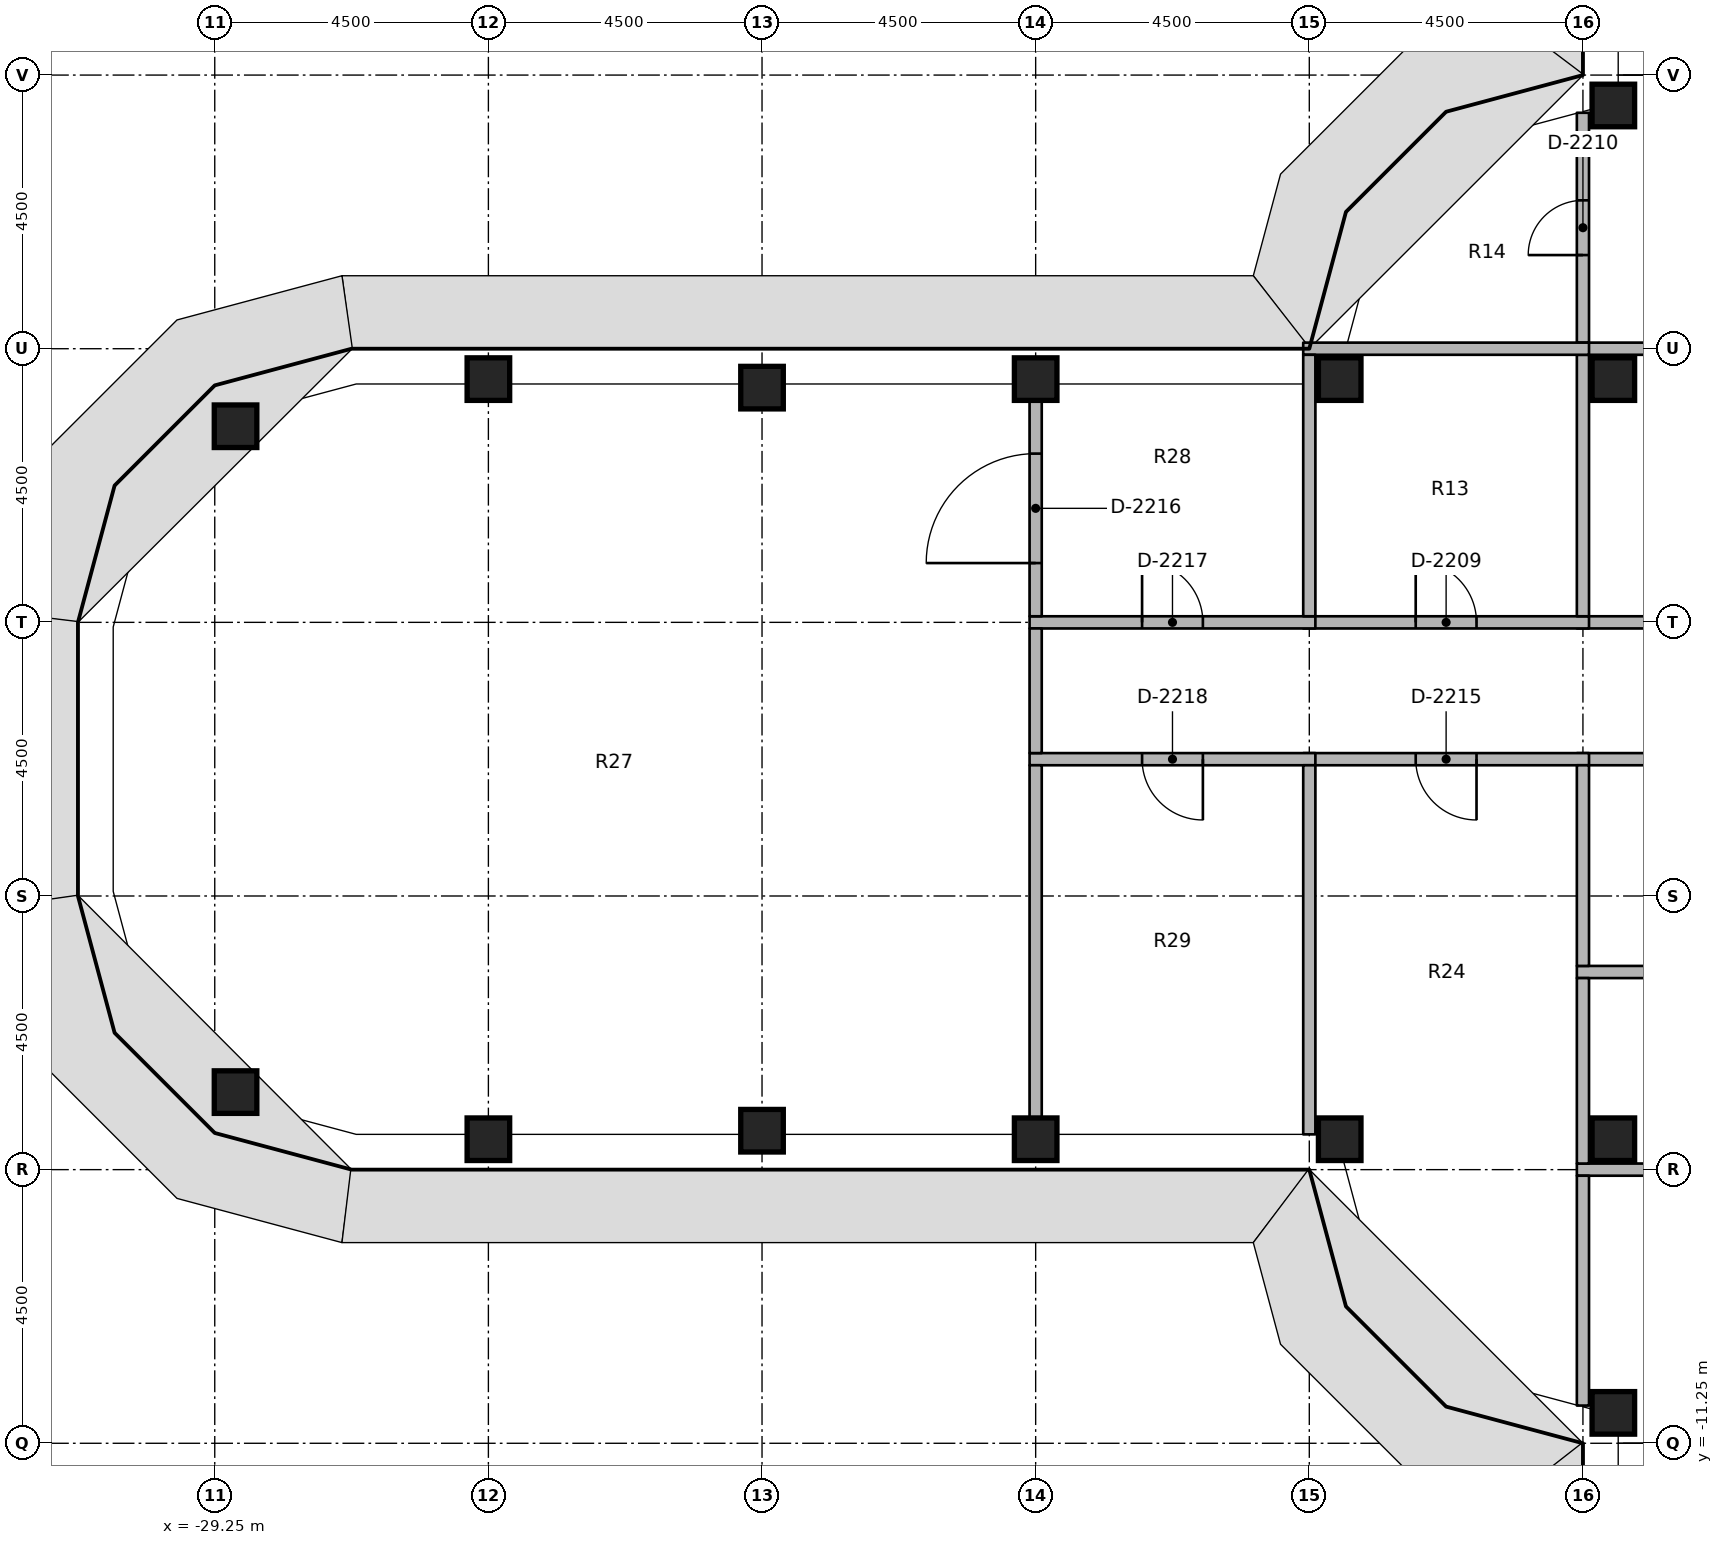
"""IFC4 building model, lengths in metres.
Left out: names, types, materials, properties, quantities, classifications, styles, units other than length and angle.
Written with IfcOpenShell. Run it as: python <this file> out.ifc"""

import sys

from ifc_helpers import new_model, si_unit, direction, frame, frame_2d, origin, origin_2d, place, context, subcontext, project, spatial, rectangle, extrude, element, fill, save


model = new_model("IFC4")
c1 = context("Model", 3, precision=1e-05, world=origin(), true_north=direction((0.0, 1.0)))
c2 = subcontext(c1, "Body", "Model", "MODEL_VIEW")
j1 = project(units=[si_unit("LENGTHUNIT", "METRE"), si_unit("PLANEANGLEUNIT", "RADIAN")], contexts=[c1])
p1 = place(None, origin())
s1 = spatial("IfcSite", under=j1, at=p1, CompositionType="ELEMENT")
p2 = place(p1, origin())
s2 = spatial("IfcBuilding", under=s1, at=p2, CompositionType="ELEMENT")
p3 = place(p2, frame((0.0, 0.0, 206.8)))
s3 = spatial("IfcBuildingStorey", under=s2, at=p3, CompositionType="ELEMENT", Elevation=206.8)
for number, where, z_axis, x_axis in (
    (1, (-28.908, -5.475, 0.0), (0.0, 0.0, 1.0), (1.0, 0.0, 0.0)),
    (2, (-28.908, 5.475, 0.0), (0.0, 0.0, 1.0), (1.0, 0.0, 0.0)),
    (3, (-24.75, -6.25, 0.0), (0.0, 0.0, 1.0), (1.0, 0.0, 0.0)),
    (4, (-24.75, 6.25, 0.0), (0.0, 0.0, 1.0), (1.0, 0.0, 0.0)),
    (5, (-20.25, -6.11, 0.0), (0.0, 0.0, 1.0), (1.0, 0.0, 0.0)),
    (6, (-20.25, 6.11, 0.0), (0.0, 0.0, 1.0), (1.0, 0.0, 0.0)),
    (7, (-15.75, -6.25, 0.0), (0.0, 0.0, 1.0), (1.0, 0.0, 0.0)),
    (8, (-15.75, 6.25, 0.0), (0.0, 0.0, 1.0), (1.0, 0.0, 0.0)),
    (9, (-10.75, -6.25, 0.0), (0.0, 0.0, 1.0), (1.0, 0.0, 0.0)),
    (10, (-10.75, 6.25, 0.0), (0.0, 0.0, 1.0), (1.0, 0.0, 0.0)),
    (11, (-6.25, -10.75, 0.0), (0.0, 0.0, 1.0), (1.0, 0.0, 0.0)),
    (12, (-6.25, -6.25, 0.0), (0.0, 0.0, 1.0), (1.0, 0.0, 0.0)),
    (13, (-6.25, 6.25, 0.0), (0.0, 0.0, 1.0), (1.0, 0.0, 0.0)),
    (14, (-6.25, 10.75, 0.0), (0.0, 0.0, 1.0), (1.0, 0.0, 0.0)),
):
    element("IfcColumn", number, at=place(p3, frame(where, z_axis=z_axis, x_axis=x_axis)), inside=s3, PredefinedType="COLUMN", context=c2, shape_type="SweptSolid", body=[
        extrude(rectangle(XDim=0.7, YDim=0.7, at=origin_2d()), origin(), (0.0, 0.0, 1.0), 3.65),
    ])
p4 = place(p3, frame((-6.85, 2.25, 0.0), z_axis=(0.0, 0.0, 1.0), x_axis=(1.0, 0.0, 0.0)))
e15 = element("IfcWall", 15, at=p4, inside=s3, PredefinedType="PARTITIONING", context=c2, shape_type="SweptSolid", body=[
    extrude(rectangle(XDim=5.825, YDim=0.2, at=frame_2d((2.913, 0.0))), origin(), (0.0, 0.0, 1.0), 2.75),
])
p5 = place(p4, frame((2.413, 0.0, 0.0)))
e16 = element("IfcOpeningElement", 16, at=p5, cuts=e15, PredefinedType="OPENING", context=c2, shape_type="SweptSolid", body=[
    extrude(rectangle(XDim=1.0, YDim=2.1, at=frame_2d((0.5, 1.05))), frame((0.0, 0.11, 0.0), z_axis=(0.0, -1.0, 0.0), x_axis=(1.0, 0.0, 0.0)), (0.0, 0.0, 1.0), 0.22),
])
p6 = place(p3, frame((-11.35, 2.25, 0.0), z_axis=(0.0, 0.0, 1.0), x_axis=(1.0, 0.0, 0.0)))
e17 = element("IfcWall", 17, at=p6, inside=s3, PredefinedType="PARTITIONING", context=c2, shape_type="SweptSolid", body=[
    extrude(rectangle(XDim=4.7, YDim=0.2, at=frame_2d((2.35, 0.0))), origin(), (0.0, 0.0, 1.0), 2.75),
])
p7 = place(p6, frame((1.85, 0.0, 0.0)))
e18 = element("IfcOpeningElement", 18, at=p7, cuts=e17, PredefinedType="OPENING", context=c2, shape_type="SweptSolid", body=[
    extrude(rectangle(XDim=1.0, YDim=2.1, at=frame_2d((0.5, 1.05))), frame((0.0, 0.11, 0.0), z_axis=(0.0, -1.0, 0.0), x_axis=(1.0, 0.0, 0.0)), (0.0, 0.0, 1.0), 0.22),
])
p8 = place(p3, frame((-1.025, 0.0, 0.0), z_axis=(0.0, 0.0, 1.0), x_axis=(-1.0, 0.0, 0.0)))
e19 = element("IfcWall", 19, at=p8, inside=s3, PredefinedType="PARTITIONING", context=c2, shape_type="SweptSolid", body=[
    extrude(rectangle(XDim=5.825, YDim=0.2, at=frame_2d((2.913, 0.0))), origin(), (0.0, 0.0, 1.0), 2.75),
])
p9 = place(p8, frame((2.462, 0.0, 0.0)))
e20 = element("IfcOpeningElement", 20, at=p9, cuts=e19, PredefinedType="OPENING", context=c2, shape_type="SweptSolid", body=[
    extrude(rectangle(XDim=0.9, YDim=2.1, at=frame_2d((0.45, 1.05))), frame((0.0, 0.11, 0.0), z_axis=(0.0, -1.0, 0.0), x_axis=(1.0, 0.0, 0.0)), (0.0, 0.0, 1.0), 0.22),
])
p10 = place(p3, frame((-6.65, 0.0, 0.0), z_axis=(0.0, 0.0, 1.0), x_axis=(-1.0, 0.0, 0.0)))
e21 = element("IfcWall", 21, at=p10, inside=s3, PredefinedType="PARTITIONING", context=c2, shape_type="SweptSolid", body=[
    extrude(rectangle(XDim=4.7, YDim=0.2, at=frame_2d((2.35, 0.0))), origin(), (0.0, 0.0, 1.0), 2.75),
])
p11 = place(p10, frame((1.85, 0.0, 0.0)))
e22 = element("IfcOpeningElement", 22, at=p11, cuts=e21, PredefinedType="OPENING", context=c2, shape_type="SweptSolid", body=[
    extrude(rectangle(XDim=1.0, YDim=2.1, at=frame_2d((0.5, 1.05))), frame((0.0, 0.11, 0.0), z_axis=(0.0, -1.0, 0.0), x_axis=(1.0, 0.0, 0.0)), (0.0, 0.0, 1.0), 0.22),
])
p12 = place(p3, frame((-15.85, 2.25, 0.0), z_axis=(0.0, 0.0, 1.0), x_axis=(1.0, 0.0, 0.0)))
e23 = element("IfcWall", 23, at=p12, inside=s3, PredefinedType="PARTITIONING", context=c2, shape_type="SweptSolid", body=[
    extrude(rectangle(XDim=4.7, YDim=0.2, at=frame_2d((2.35, 0.0))), origin(), (0.0, 0.0, 1.0), 2.75),
])
p13 = place(p12, frame((1.85, 0.0, 0.0)))
e24 = element("IfcOpeningElement", 24, at=p13, cuts=e23, PredefinedType="OPENING", context=c2, shape_type="SweptSolid", body=[
    extrude(rectangle(XDim=1.0, YDim=2.1, at=frame_2d((0.5, 1.05))), frame((0.0, 0.11, 0.0), z_axis=(0.0, -1.0, 0.0), x_axis=(1.0, 0.0, 0.0)), (0.0, 0.0, 1.0), 0.22),
])
p14 = place(p3, frame((-11.15, 0.0, 0.0), z_axis=(0.0, 0.0, 1.0), x_axis=(-1.0, 0.0, 0.0)))
e25 = element("IfcWall", 25, at=p14, inside=s3, PredefinedType="PARTITIONING", context=c2, shape_type="SweptSolid", body=[
    extrude(rectangle(XDim=4.7, YDim=0.2, at=frame_2d((2.35, 0.0))), origin(), (0.0, 0.0, 1.0), 2.75),
])
p15 = place(p14, frame((1.85, 0.0, 0.0)))
e26 = element("IfcOpeningElement", 26, at=p15, cuts=e25, PredefinedType="OPENING", context=c2, shape_type="SweptSolid", body=[
    extrude(rectangle(XDim=1.0, YDim=2.1, at=frame_2d((0.5, 1.05))), frame((0.0, 0.11, 0.0), z_axis=(0.0, -1.0, 0.0), x_axis=(1.0, 0.0, 0.0)), (0.0, 0.0, 1.0), 0.22),
])
p16 = place(p3, frame((-15.75, 0.1, 0.0), z_axis=(0.0, 0.0, 1.0), x_axis=(0.0, 1.0, 0.0)))
e27 = element("IfcWall", 27, at=p16, inside=s3, PredefinedType="PARTITIONING", context=c2, shape_type="SweptSolid", body=[
    extrude(rectangle(XDim=2.05, YDim=0.2, at=frame_2d((1.025, 0.0))), origin(), (0.0, 0.0, 1.0), 2.75),
])
p17 = place(p3, frame((-6.85, 6.75, 0.0), z_axis=(0.0, 0.0, 1.0), x_axis=(1.0, 0.0, 0.0)))
e28 = element("IfcWall", 28, at=p17, inside=s3, PredefinedType="PARTITIONING", context=c2, shape_type="SweptSolid", body=[
    extrude(rectangle(XDim=5.825, YDim=0.2, at=frame_2d((2.913, 0.0))), origin(), (0.0, 0.0, 1.0), 2.75),
])
p18 = place(p3, frame((-6.75, 6.85, 0.0), z_axis=(0.0, 0.0, 1.0), x_axis=(0.0, 1.0, 0.0)))
e29 = element("IfcWall", 29, at=p18, inside=s3, PredefinedType="PARTITIONING", context=c2, shape_type="SweptSolid", body=[
    extrude(rectangle(XDim=3.78, YDim=0.2, at=frame_2d((1.89, 0.0))), origin(), (0.0, 0.0, 1.0), 2.75),
])
p19 = place(p18, frame((1.44, 0.0, 0.0)))
e30 = element("IfcOpeningElement", 30, at=p19, cuts=e29, PredefinedType="OPENING", context=c2, shape_type="SweptSolid", body=[
    extrude(rectangle(XDim=0.9, YDim=2.1, at=frame_2d((0.45, 1.05))), frame((0.0, 0.11, 0.0), z_axis=(0.0, -1.0, 0.0), x_axis=(1.0, 0.0, 0.0)), (0.0, 0.0, 1.0), 0.22),
])
p20 = place(p3, frame((-6.85, -6.75, 0.0), z_axis=(0.0, 0.0, 1.0), x_axis=(1.0, 0.0, 0.0)))
e31 = element("IfcWall", 31, at=p20, inside=s3, PredefinedType="PARTITIONING", context=c2, shape_type="SweptSolid", body=[
    extrude(rectangle(XDim=5.825, YDim=0.2, at=frame_2d((2.913, 0.0))), origin(), (0.0, 0.0, 1.0), 2.75),
])
p21 = place(p3, frame((-6.75, -10.63, 0.0), z_axis=(0.0, 0.0, 1.0), x_axis=(0.0, 1.0, 0.0)))
e32 = element("IfcWall", 32, at=p21, inside=s3, PredefinedType="PARTITIONING", context=c2, shape_type="SweptSolid", body=[
    extrude(rectangle(XDim=3.78, YDim=0.2, at=frame_2d((1.89, 0.0))), origin(), (0.0, 0.0, 1.0), 2.75),
])
p22 = place(p3, frame((-6.75, 2.35, 0.0), z_axis=(0.0, 0.0, 1.0), x_axis=(0.0, 1.0, 0.0)))
e33 = element("IfcWall", 33, at=p22, inside=s3, PredefinedType="PARTITIONING", context=c2, shape_type="SweptSolid", body=[
    extrude(rectangle(XDim=4.3, YDim=0.2, at=frame_2d((2.15, 0.0))), origin(), (0.0, 0.0, 1.0), 2.75),
])
p23 = place(p3, frame((-11.35, 6.75, 0.0), z_axis=(0.0, 0.0, 1.0), x_axis=(1.0, 0.0, 0.0)))
e34 = element("IfcWall", 34, at=p23, inside=s3, PredefinedType="PARTITIONING", context=c2, shape_type="SweptSolid", body=[
    extrude(rectangle(XDim=4.7, YDim=0.2, at=frame_2d((2.35, 0.0))), origin(), (0.0, 0.0, 1.0), 2.75),
])
p24 = place(p3, frame((-11.25, 2.35, 0.0), z_axis=(0.0, 0.0, 1.0), x_axis=(0.0, 1.0, 0.0)))
e35 = element("IfcWall", 35, at=p24, inside=s3, PredefinedType="PARTITIONING", context=c2, shape_type="SweptSolid", body=[
    extrude(rectangle(XDim=4.3, YDim=0.2, at=frame_2d((2.15, 0.0))), origin(), (0.0, 0.0, 1.0), 2.75),
])
p25 = place(p3, frame((-6.85, -3.5, 0.0), z_axis=(0.0, 0.0, 1.0), x_axis=(1.0, 0.0, 0.0)))
e36 = element("IfcWall", 36, at=p25, inside=s3, PredefinedType="PARTITIONING", context=c2, shape_type="SweptSolid", body=[
    extrude(rectangle(XDim=5.825, YDim=0.2, at=frame_2d((2.913, 0.0))), origin(), (0.0, 0.0, 1.0), 2.75),
])
p26 = place(p3, frame((-6.75, -3.4, 0.0), z_axis=(0.0, 0.0, 1.0), x_axis=(0.0, 1.0, 0.0)))
e37 = element("IfcWall", 37, at=p26, inside=s3, PredefinedType="PARTITIONING", context=c2, shape_type="SweptSolid", body=[
    extrude(rectangle(XDim=3.3, YDim=0.2, at=frame_2d((1.65, 0.0))), origin(), (0.0, 0.0, 1.0), 2.75),
])
p27 = place(p3, frame((-6.75, -6.65, 0.0), z_axis=(0.0, 0.0, 1.0), x_axis=(0.0, 1.0, 0.0)))
e38 = element("IfcWall", 38, at=p27, inside=s3, PredefinedType="PARTITIONING", context=c2, shape_type="SweptSolid", body=[
    extrude(rectangle(XDim=3.05, YDim=0.2, at=frame_2d((1.525, 0.0))), origin(), (0.0, 0.0, 1.0), 2.75),
])
p28 = place(p3, frame((-11.25, -6.17, 0.0), z_axis=(0.0, 0.0, 1.0), x_axis=(0.0, 1.0, 0.0)))
e39 = element("IfcWall", 39, at=p28, inside=s3, PredefinedType="PARTITIONING", context=c2, shape_type="SweptSolid", body=[
    extrude(rectangle(XDim=6.07, YDim=0.2, at=frame_2d((3.035, 0.0))), origin(), (0.0, 0.0, 1.0), 2.75),
])
p29 = place(p3, frame((-15.75, 2.35, 0.0), z_axis=(0.0, 0.0, 1.0), x_axis=(0.0, 1.0, 0.0)))
e40 = element("IfcWall", 40, at=p29, inside=s3, PredefinedType="PARTITIONING", context=c2, shape_type="SweptSolid", body=[
    extrude(rectangle(XDim=3.55, YDim=0.2, at=frame_2d((1.775, 0.0))), origin(), (0.0, 0.0, 1.0), 2.75),
])
p30 = place(p29, frame((0.875, 0.0, 0.0)))
e41 = element("IfcOpeningElement", 41, at=p30, cuts=e40, PredefinedType="OPENING", context=c2, shape_type="SweptSolid", body=[
    extrude(rectangle(XDim=1.8, YDim=2.1, at=frame_2d((0.9, 1.05))), frame((0.0, 0.11, 0.0), z_axis=(0.0, -1.0, 0.0), x_axis=(1.0, 0.0, 0.0)), (0.0, 0.0, 1.0), 0.22),
])
p31 = place(p3, frame((-15.75, -5.9, 0.0), z_axis=(0.0, 0.0, 1.0), x_axis=(0.0, 1.0, 0.0)))
e42 = element("IfcWall", 42, at=p31, inside=s3, PredefinedType="PARTITIONING", context=c2, shape_type="SweptSolid", body=[
    extrude(rectangle(XDim=5.8, YDim=0.2, at=frame_2d((2.9, 0.0))), origin(), (0.0, 0.0, 1.0), 2.75),
])
p32 = place(p7, origin())
e43 = element("IfcDoor", 43, at=p32, inside=s3, OperationType="SINGLE_SWING_RIGHT", PredefinedType="DOOR", context=c2, shape_type="SweptSolid", body=[
    extrude(rectangle(XDim=1.0, YDim=2.1, at=frame_2d((0.5, 1.05))), frame((0.0, 0.025, 0.0), z_axis=(0.0, -1.0, 0.0), x_axis=(1.0, 0.0, 0.0)), (0.0, 0.0, 1.0), 0.05),
])
fill(e18, e43)
p33 = place(p19, origin())
e44 = element("IfcDoor", 44, at=p33, inside=s3, OperationType="SINGLE_SWING_LEFT", PredefinedType="DOOR", context=c2, shape_type="SweptSolid", body=[
    extrude(rectangle(XDim=0.9, YDim=2.1, at=frame_2d((0.45, 1.05))), frame((0.0, 0.025, 0.0), z_axis=(0.0, -1.0, 0.0), x_axis=(1.0, 0.0, 0.0)), (0.0, 0.0, 1.0), 0.05),
])
fill(e30, e44)
p34 = place(p11, origin())
e45 = element("IfcDoor", 45, at=p34, inside=s3, OperationType="SINGLE_SWING_RIGHT", PredefinedType="DOOR", context=c2, shape_type="SweptSolid", body=[
    extrude(rectangle(XDim=1.0, YDim=2.1, at=frame_2d((0.5, 1.05))), frame((0.0, 0.025, 0.0), z_axis=(0.0, -1.0, 0.0), x_axis=(1.0, 0.0, 0.0)), (0.0, 0.0, 1.0), 0.05),
])
fill(e22, e45)
p35 = place(p30, origin())
e46 = element("IfcDoor", 46, at=p35, inside=s3, OperationType="DOUBLE_DOOR_SINGLE_SWING", PredefinedType="DOOR", context=c2, shape_type="SweptSolid", body=[
    extrude(rectangle(XDim=1.8, YDim=2.1, at=frame_2d((0.9, 1.05))), frame((0.0, 0.025, 0.0), z_axis=(0.0, -1.0, 0.0), x_axis=(1.0, 0.0, 0.0)), (0.0, 0.0, 1.0), 0.05),
])
fill(e41, e46)
p36 = place(p13, origin())
e47 = element("IfcDoor", 47, at=p36, inside=s3, OperationType="SINGLE_SWING_RIGHT", PredefinedType="DOOR", context=c2, shape_type="SweptSolid", body=[
    extrude(rectangle(XDim=1.0, YDim=2.1, at=frame_2d((0.5, 1.05))), frame((0.0, 0.025, 0.0), z_axis=(0.0, -1.0, 0.0), x_axis=(1.0, 0.0, 0.0)), (0.0, 0.0, 1.0), 0.05),
])
fill(e24, e47)
p37 = place(p15, origin())
e48 = element("IfcDoor", 48, at=p37, inside=s3, OperationType="SINGLE_SWING_RIGHT", PredefinedType="DOOR", context=c2, shape_type="SweptSolid", body=[
    extrude(rectangle(XDim=1.0, YDim=2.1, at=frame_2d((0.5, 1.05))), frame((0.0, 0.025, 0.0), z_axis=(0.0, -1.0, 0.0), x_axis=(1.0, 0.0, 0.0)), (0.0, 0.0, 1.0), 0.05),
])
fill(e26, e48)
save(model, sys.argv[1])
